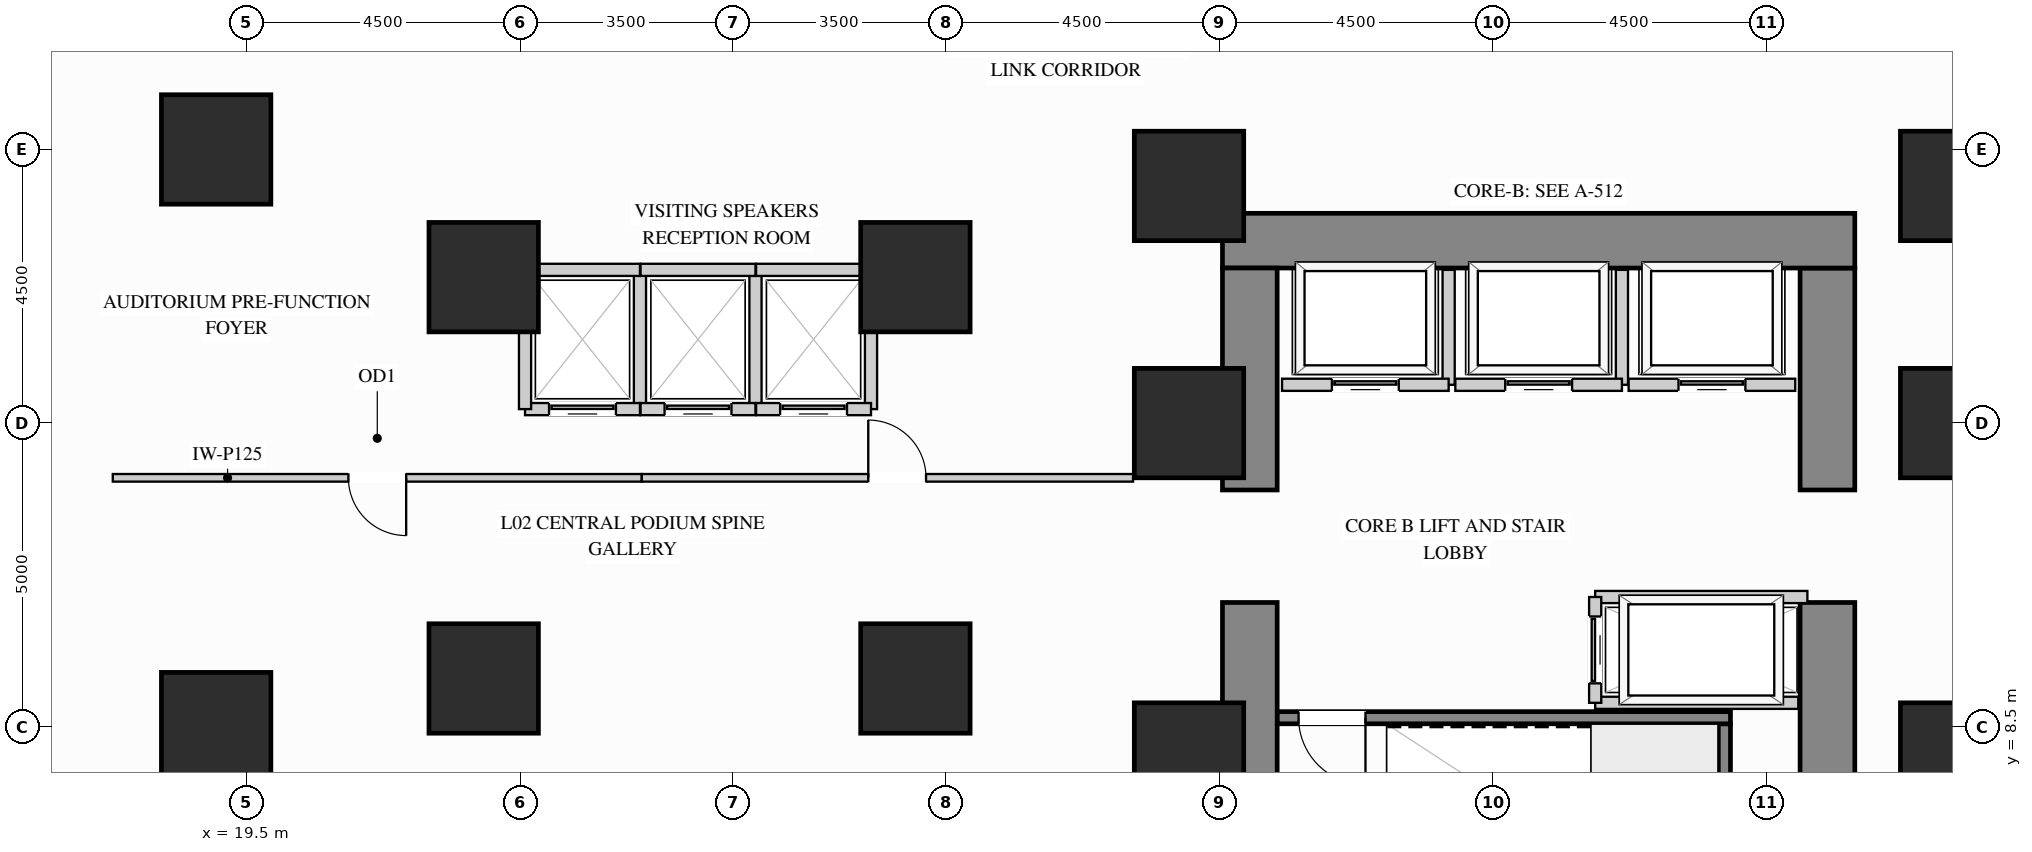
"""IFC4 building model, lengths in metres.
Left out: names, types, materials, properties, quantities, classifications, styles, units other than length and angle.
Written with IfcOpenShell. Run it as: python <this file> out.ifc"""

import sys

from ifc_helpers import new_model, si_unit, direction, frame, frame_2d, origin, origin_2d, place, context, subcontext, project, spatial, rectangle, extrude, source, transform, mapped, element, fill, save


model = new_model("IFC4")
c1 = context("Model", 3, precision=1e-05, world=origin(), true_north=direction((0.0, 1.0)))
c2 = subcontext(c1, "Body", "Model", "MODEL_VIEW")
j1 = project(units=[si_unit("LENGTHUNIT", "METRE"), si_unit("PLANEANGLEUNIT", "RADIAN")], contexts=[c1])
p1 = place(None, origin())
s1 = spatial("IfcSite", under=j1, at=p1, CompositionType="ELEMENT")
p2 = place(p1, origin())
s2 = spatial("IfcBuilding", under=s1, at=p2, CompositionType="ELEMENT")
p3 = place(p2, frame((0.0, 0.0, 9.0)))
s3 = spatial("IfcBuildingStorey", under=s2, at=p3, CompositionType="ELEMENT", Elevation=9.0)
m1 = source(origin(), c2, "Body", "SweptSolid", [
    extrude(rectangle(XDim=1.8, YDim=1.8, at=origin_2d()), origin(), (0.0, 0.0, 1.0), 4.25),
])
for number, where, z_axis, x_axis in (
    (1, (47.6, 8.0, 0.0), (0.0, 0.0, 1.0), (1.0, 0.0, 0.0)),
    (2, (47.6, 13.5, 0.0), (0.0, 0.0, 1.0), (1.0, 0.0, 0.0)),
    (3, (47.6, 17.4, 0.0), (0.0, 0.0, 1.0), (1.0, 0.0, 0.0)),
    (4, (19.0, 8.5, 0.0), (0.0, 0.0, 1.0), (1.0, 0.0, 0.0)),
    (5, (19.0, 18.0, 0.0), (0.0, 0.0, 1.0), (1.0, 0.0, 0.0)),
    (6, (35.0, 8.0, 0.0), (0.0, 0.0, 1.0), (1.0, 0.0, 0.0)),
    (7, (35.0, 13.5, 0.0), (0.0, 0.0, 1.0), (1.0, 0.0, 0.0)),
    (8, (35.0, 17.4, 0.0), (0.0, 0.0, 1.0), (1.0, 0.0, 0.0)),
    (9, (23.4, 9.3, 0.0), (0.0, 0.0, 1.0), (1.0, 0.0, 0.0)),
    (10, (30.5, 9.3, 0.0), (0.0, 0.0, 1.0), (1.0, 0.0, 0.0)),
    (11, (23.4, 15.9, 0.0), (0.0, 0.0, 1.0), (1.0, 0.0, 0.0)),
    (12, (30.5, 15.9, 0.0), (0.0, 0.0, 1.0), (1.0, 0.0, 0.0)),
):
    element("IfcColumn", number, at=place(p3, frame(where, z_axis=z_axis, x_axis=x_axis)), inside=s3, PredefinedType="COLUMN", context=c2, shape_type="MappedRepresentation", body=[
        mapped(m1, transform((0.0, 0.0, 0.0), x_axis=(1.0, 0.0, 0.0), y_axis=(0.0, 1.0, 0.0), z_axis=(0.0, 0.0, 1.0))),
    ])
m2 = source(origin(), c2, "Body", "SweptSolid", [
    extrude(rectangle(XDim=5.6, YDim=0.9, at=frame_2d((2.8, 0.0))), origin(), (0.0, 0.0, 1.0), 4.25),
])
p4 = place(p3, frame((45.5, 4.95, 0.0), z_axis=(0.0, 0.0, 1.0), x_axis=(0.0, 1.0, 0.0)))
e13 = element("IfcWall", 13, at=p4, inside=s3, PredefinedType="SHEAR", context=c2, shape_type="MappedRepresentation", body=[
    mapped(m2, transform((0.0, 0.0, 0.0), x_axis=(1.0, 0.0, 0.0), y_axis=(0.0, 1.0, 0.0), z_axis=(0.0, 0.0, 1.0))),
])
m3 = source(origin(), c2, "Body", "SweptSolid", [
    extrude(rectangle(XDim=3.65, YDim=0.9, at=frame_2d((1.825, 0.0))), origin(), (0.0, 0.0, 1.0), 4.25),
])
p5 = place(p3, frame((45.5, 12.4, 0.0), z_axis=(0.0, 0.0, 1.0), x_axis=(0.0, 1.0, 0.0)))
e14 = element("IfcWall", 14, at=p5, inside=s3, PredefinedType="SHEAR", context=c2, shape_type="MappedRepresentation", body=[
    mapped(m3, transform((0.0, 0.0, 0.0), x_axis=(1.0, 0.0, 0.0), y_axis=(0.0, 1.0, 0.0), z_axis=(0.0, 0.0, 1.0))),
])
m4 = source(origin(), c2, "Body", "SweptSolid", [
    extrude(rectangle(XDim=10.4, YDim=0.9, at=frame_2d((5.2, 0.0))), origin(), (0.0, 0.0, 1.0), 4.25),
])
p6 = place(p3, frame((35.55, 16.5, 0.0), z_axis=(0.0, 0.0, 1.0), x_axis=(1.0, 0.0, 0.0)))
e15 = element("IfcWall", 15, at=p6, inside=s3, PredefinedType="SHEAR", context=c2, shape_type="MappedRepresentation", body=[
    mapped(m4, transform((0.0, 0.0, 0.0), x_axis=(1.0, 0.0, 0.0), y_axis=(0.0, 1.0, 0.0), z_axis=(0.0, 0.0, 1.0))),
])
p7 = place(p3, frame((36.0, 4.95, 0.0), z_axis=(0.0, 0.0, 1.0), x_axis=(0.0, 1.0, 0.0)))
e16 = element("IfcWall", 16, at=p7, inside=s3, PredefinedType="SHEAR", context=c2, shape_type="MappedRepresentation", body=[
    mapped(m2, transform((0.0, 0.0, 0.0), x_axis=(1.0, 0.0, 0.0), y_axis=(0.0, 1.0, 0.0), z_axis=(0.0, 0.0, 1.0))),
])
p8 = place(p3, frame((36.0, 12.4, 0.0), z_axis=(0.0, 0.0, 1.0), x_axis=(0.0, 1.0, 0.0)))
e17 = element("IfcWall", 17, at=p8, inside=s3, PredefinedType="SHEAR", context=c2, shape_type="MappedRepresentation", body=[
    mapped(m3, transform((0.0, 0.0, 0.0), x_axis=(1.0, 0.0, 0.0), y_axis=(0.0, 1.0, 0.0), z_axis=(0.0, 0.0, 1.0))),
])
p9 = place(p3, frame((17.3, 12.6, 0.0), z_axis=(0.0, 0.0, 1.0), x_axis=(1.0, 0.0, 0.0)))
e18 = element("IfcWall", 18, at=p9, inside=s3, PredefinedType="PARTITIONING", context=c2, shape_type="SweptSolid", body=[
    extrude(rectangle(XDim=8.7, YDim=0.125, at=frame_2d((4.35, 0.0))), origin(), (0.0, 0.0, 1.0), 4.235),
])
p10 = place(p9, frame((3.875, 0.0, 0.0)))
e19 = element("IfcOpeningElement", 19, at=p10, cuts=e18, PredefinedType="OPENING", context=c2, shape_type="SweptSolid", body=[
    extrude(rectangle(XDim=0.95, YDim=2.15, at=frame_2d((0.475, 1.075))), frame((0.0, 0.073, 0.0), z_axis=(0.0, -1.0, 0.0), x_axis=(1.0, 0.0, 0.0)), (0.0, 0.0, 1.0), 0.145),
])
p11 = place(p3, frame((26.0, 12.6, 0.0), z_axis=(0.0, 0.0, 1.0), x_axis=(1.0, 0.0, 0.0)))
e20 = element("IfcWall", 20, at=p11, inside=s3, PredefinedType="PARTITIONING", context=c2, shape_type="SweptSolid", body=[
    extrude(rectangle(XDim=8.08, YDim=0.125, at=frame_2d((4.04, 0.0))), origin(), (0.0, 0.0, 1.0), 4.235),
])
p12 = place(p11, frame((3.725, 0.0, 0.0)))
e21 = element("IfcOpeningElement", 21, at=p12, cuts=e20, PredefinedType="OPENING", context=c2, shape_type="SweptSolid", body=[
    extrude(rectangle(XDim=0.95, YDim=2.15, at=frame_2d((0.475, 1.075))), frame((0.0, 0.073, 0.0), z_axis=(0.0, -1.0, 0.0), x_axis=(1.0, 0.0, 0.0)), (0.0, 0.0, 1.0), 0.145),
])
m5 = source(origin(), c2, "Body", "SweptSolid", [
    extrude(rectangle(XDim=1.89, YDim=0.2, at=frame_2d((0.945, 0.0))), origin(), (0.0, 0.0, 1.0), 4.235),
])
p13 = place(p3, frame((39.27, 14.13, 0.0), z_axis=(0.0, 0.0, 1.0), x_axis=(0.0, 1.0, 0.0)))
e22 = element("IfcWall", 22, at=p13, inside=s3, PredefinedType="PARTITIONING", context=c2, shape_type="MappedRepresentation", body=[
    mapped(m5, transform((0.0, 0.0, 0.0), x_axis=(1.0, 0.0, 0.0), y_axis=(0.0, 1.0, 0.0), z_axis=(0.0, 0.0, 1.0))),
])
p14 = place(p3, frame((36.53, 14.13, 0.0), z_axis=(0.0, 0.0, 1.0), x_axis=(1.0, 0.0, 0.0)))
e23 = element("IfcWall", 23, at=p14, inside=s3, PredefinedType="PARTITIONING", context=c2, shape_type="SweptSolid", body=[
    extrude(rectangle(XDim=2.74, YDim=0.2, at=frame_2d((1.37, 0.0))), origin(), (0.0, 0.0, 1.0), 4.235),
])
p15 = place(p14, frame((0.82, 0.0, 0.0)))
e24 = element("IfcOpeningElement", 24, at=p15, cuts=e23, PredefinedType="OPENING", context=c2, shape_type="SweptSolid", body=[
    extrude(rectangle(XDim=1.1, YDim=2.2, at=frame_2d((0.55, 1.1))), frame((0.0, 0.11, 0.0), z_axis=(0.0, -1.0, 0.0), x_axis=(1.0, 0.0, 0.0)), (0.0, 0.0, 1.0), 0.22),
])
p16 = place(p3, frame((42.12, 14.13, 0.0), z_axis=(0.0, 0.0, 1.0), x_axis=(0.0, 1.0, 0.0)))
e25 = element("IfcWall", 25, at=p16, inside=s3, PredefinedType="PARTITIONING", context=c2, shape_type="MappedRepresentation", body=[
    mapped(m5, transform((0.0, 0.0, 0.0), x_axis=(1.0, 0.0, 0.0), y_axis=(0.0, 1.0, 0.0), z_axis=(0.0, 0.0, 1.0))),
])
p17 = place(p3, frame((39.38, 14.13, 0.0), z_axis=(0.0, 0.0, 1.0), x_axis=(1.0, 0.0, 0.0)))
e26 = element("IfcWall", 26, at=p17, inside=s3, PredefinedType="PARTITIONING", context=c2, shape_type="SweptSolid", body=[
    extrude(rectangle(XDim=2.74, YDim=0.2, at=frame_2d((1.37, 0.0))), origin(), (0.0, 0.0, 1.0), 4.235),
])
p18 = place(p17, frame((0.82, 0.0, 0.0)))
e27 = element("IfcOpeningElement", 27, at=p18, cuts=e26, PredefinedType="OPENING", context=c2, shape_type="SweptSolid", body=[
    extrude(rectangle(XDim=1.1, YDim=2.2, at=frame_2d((0.55, 1.1))), frame((0.0, 0.11, 0.0), z_axis=(0.0, -1.0, 0.0), x_axis=(1.0, 0.0, 0.0)), (0.0, 0.0, 1.0), 0.22),
])
p19 = place(p3, frame((42.23, 14.13, 0.0), z_axis=(0.0, 0.0, 1.0), x_axis=(1.0, 0.0, 0.0)))
e28 = element("IfcWall", 28, at=p19, inside=s3, PredefinedType="PARTITIONING", context=c2, shape_type="SweptSolid", body=[
    extrude(rectangle(XDim=2.74, YDim=0.2, at=frame_2d((1.37, 0.0))), origin(), (0.0, 0.0, 1.0), 4.235),
])
p20 = place(p19, frame((0.82, 0.0, 0.0)))
e29 = element("IfcOpeningElement", 29, at=p20, cuts=e28, PredefinedType="OPENING", context=c2, shape_type="SweptSolid", body=[
    extrude(rectangle(XDim=1.1, YDim=2.2, at=frame_2d((0.55, 1.1))), frame((0.0, 0.11, 0.0), z_axis=(0.0, -1.0, 0.0), x_axis=(1.0, 0.0, 0.0)), (0.0, 0.0, 1.0), 0.22),
])
m6 = source(origin(), c2, "Body", "SweptSolid", [
    extrude(rectangle(XDim=2.29, YDim=0.2, at=frame_2d((1.145, 0.0))), origin(), (0.0, 0.0, 1.0), 4.235),
])
p21 = place(p3, frame((25.97, 13.73, 0.0), z_axis=(0.0, 0.0, 1.0), x_axis=(0.0, 1.0, 0.0)))
e30 = element("IfcWall", 30, at=p21, inside=s3, PredefinedType="PARTITIONING", context=c2, shape_type="MappedRepresentation", body=[
    mapped(m6, transform((0.0, 0.0, 0.0), x_axis=(1.0, 0.0, 0.0), y_axis=(0.0, 1.0, 0.0), z_axis=(0.0, 0.0, 1.0))),
])
m7 = source(origin(), c2, "Body", "SweptSolid", [
    extrude(rectangle(XDim=1.89, YDim=0.2, at=frame_2d((0.945, 0.0))), origin(), (0.0, 0.0, 1.0), 4.235),
])
p22 = place(p3, frame((24.08, 16.02, 0.0), z_axis=(0.0, 0.0, 1.0), x_axis=(1.0, 0.0, 0.0)))
e31 = element("IfcWall", 31, at=p22, inside=s3, PredefinedType="PARTITIONING", context=c2, shape_type="MappedRepresentation", body=[
    mapped(m7, transform((0.0, 0.0, 0.0), x_axis=(1.0, 0.0, 0.0), y_axis=(0.0, 1.0, 0.0), z_axis=(0.0, 0.0, 1.0))),
])
p23 = place(p3, frame((24.08, 13.73, 0.0), z_axis=(0.0, 0.0, 1.0), x_axis=(1.0, 0.0, 0.0)))
e32 = element("IfcWall", 32, at=p23, inside=s3, PredefinedType="PARTITIONING", context=c2, shape_type="SweptSolid", body=[
    extrude(rectangle(XDim=1.89, YDim=0.2, at=frame_2d((0.945, 0.0))), origin(), (0.0, 0.0, 1.0), 4.235),
])
p24 = place(p23, frame((0.395, 0.0, 0.0)))
e33 = element("IfcOpeningElement", 33, at=p24, cuts=e32, PredefinedType="OPENING", context=c2, shape_type="SweptSolid", body=[
    extrude(rectangle(XDim=1.1, YDim=2.2, at=frame_2d((0.55, 1.1))), frame((0.0, 0.11, 0.0), z_axis=(0.0, -1.0, 0.0), x_axis=(1.0, 0.0, 0.0)), (0.0, 0.0, 1.0), 0.22),
])
for number, where, z_axis, x_axis in (
    (34, (24.08, 13.73, 0.0), (0.0, 0.0, 1.0), (0.0, 1.0, 0.0)),
    (35, (27.87, 13.73, 0.0), (0.0, 0.0, 1.0), (0.0, 1.0, 0.0)),
):
    element("IfcWall", number, at=place(p3, frame(where, z_axis=z_axis, x_axis=x_axis)), inside=s3, PredefinedType="PARTITIONING", context=c2, shape_type="MappedRepresentation", body=[
        mapped(m6, transform((0.0, 0.0, 0.0), x_axis=(1.0, 0.0, 0.0), y_axis=(0.0, 1.0, 0.0), z_axis=(0.0, 0.0, 1.0))),
    ])
p25 = place(p3, frame((25.98, 16.02, 0.0), z_axis=(0.0, 0.0, 1.0), x_axis=(1.0, 0.0, 0.0)))
e36 = element("IfcWall", 36, at=p25, inside=s3, PredefinedType="PARTITIONING", context=c2, shape_type="MappedRepresentation", body=[
    mapped(m5, transform((0.0, 0.0, 0.0), x_axis=(1.0, 0.0, 0.0), y_axis=(0.0, 1.0, 0.0), z_axis=(0.0, 0.0, 1.0))),
])
p26 = place(p3, frame((25.98, 13.73, 0.0), z_axis=(0.0, 0.0, 1.0), x_axis=(1.0, 0.0, 0.0)))
e37 = element("IfcWall", 37, at=p26, inside=s3, PredefinedType="PARTITIONING", context=c2, shape_type="SweptSolid", body=[
    extrude(rectangle(XDim=1.89, YDim=0.2, at=frame_2d((0.945, 0.0))), origin(), (0.0, 0.0, 1.0), 4.235),
])
p27 = place(p26, frame((0.395, 0.0, 0.0)))
e38 = element("IfcOpeningElement", 38, at=p27, cuts=e37, PredefinedType="OPENING", context=c2, shape_type="SweptSolid", body=[
    extrude(rectangle(XDim=1.1, YDim=2.2, at=frame_2d((0.55, 1.1))), frame((0.0, 0.11, 0.0), z_axis=(0.0, -1.0, 0.0), x_axis=(1.0, 0.0, 0.0)), (0.0, 0.0, 1.0), 0.22),
])
p28 = place(p3, frame((29.77, 13.73, 0.0), z_axis=(0.0, 0.0, 1.0), x_axis=(0.0, 1.0, 0.0)))
e39 = element("IfcWall", 39, at=p28, inside=s3, PredefinedType="PARTITIONING", context=c2, shape_type="MappedRepresentation", body=[
    mapped(m6, transform((0.0, 0.0, 0.0), x_axis=(1.0, 0.0, 0.0), y_axis=(0.0, 1.0, 0.0), z_axis=(0.0, 0.0, 1.0))),
])
p29 = place(p3, frame((27.88, 16.02, 0.0), z_axis=(0.0, 0.0, 1.0), x_axis=(1.0, 0.0, 0.0)))
e40 = element("IfcWall", 40, at=p29, inside=s3, PredefinedType="PARTITIONING", context=c2, shape_type="MappedRepresentation", body=[
    mapped(m5, transform((0.0, 0.0, 0.0), x_axis=(1.0, 0.0, 0.0), y_axis=(0.0, 1.0, 0.0), z_axis=(0.0, 0.0, 1.0))),
])
p30 = place(p3, frame((27.88, 13.73, 0.0), z_axis=(0.0, 0.0, 1.0), x_axis=(1.0, 0.0, 0.0)))
e41 = element("IfcWall", 41, at=p30, inside=s3, PredefinedType="PARTITIONING", context=c2, shape_type="SweptSolid", body=[
    extrude(rectangle(XDim=1.89, YDim=0.2, at=frame_2d((0.945, 0.0))), origin(), (0.0, 0.0, 1.0), 4.235),
])
p31 = place(p30, frame((0.395, 0.0, 0.0)))
e42 = element("IfcOpeningElement", 42, at=p31, cuts=e41, PredefinedType="OPENING", context=c2, shape_type="SweptSolid", body=[
    extrude(rectangle(XDim=1.1, YDim=2.2, at=frame_2d((0.55, 1.1))), frame((0.0, 0.11, 0.0), z_axis=(0.0, -1.0, 0.0), x_axis=(1.0, 0.0, 0.0)), (0.0, 0.0, 1.0), 0.22),
])
m8 = source(origin(), c2, "Body", "SweptSolid", [
    extrude(rectangle(XDim=3.49, YDim=0.2, at=frame_2d((1.745, 0.0))), origin(), (0.0, 0.0, 1.0), 4.235),
])
p32 = place(p3, frame((41.68, 10.64, 0.0), z_axis=(0.0, 0.0, 1.0), x_axis=(1.0, 0.0, 0.0)))
e43 = element("IfcWall", 43, at=p32, inside=s3, PredefinedType="PARTITIONING", context=c2, shape_type="MappedRepresentation", body=[
    mapped(m8, transform((0.0, 0.0, 0.0), x_axis=(1.0, 0.0, 0.0), y_axis=(0.0, 1.0, 0.0), z_axis=(0.0, 0.0, 1.0))),
])
m9 = source(origin(), c2, "Body", "SweptSolid", [
    extrude(rectangle(XDim=3.34, YDim=0.2, at=frame_2d((1.67, 0.0))), origin(), (0.0, 0.0, 1.0), 4.235),
])
p33 = place(p3, frame((41.68, 8.9, 0.0), z_axis=(0.0, 0.0, 1.0), x_axis=(1.0, 0.0, 0.0)))
e44 = element("IfcWall", 44, at=p33, inside=s3, PredefinedType="PARTITIONING", context=c2, shape_type="MappedRepresentation", body=[
    mapped(m9, transform((0.0, 0.0, 0.0), x_axis=(1.0, 0.0, 0.0), y_axis=(0.0, 1.0, 0.0), z_axis=(0.0, 0.0, 1.0))),
])
p34 = place(p3, frame((41.68, 8.9, 0.0), z_axis=(0.0, 0.0, 1.0), x_axis=(0.0, 1.0, 0.0)))
e45 = element("IfcWall", 45, at=p34, inside=s3, PredefinedType="PARTITIONING", context=c2, shape_type="SweptSolid", body=[
    extrude(rectangle(XDim=1.74, YDim=0.2, at=frame_2d((0.87, 0.0))), origin(), (0.0, 0.0, 1.0), 4.235),
])
p35 = place(p34, frame((0.32, 0.0, 0.0)))
e46 = element("IfcOpeningElement", 46, at=p35, cuts=e45, PredefinedType="OPENING", context=c2, shape_type="SweptSolid", body=[
    extrude(rectangle(XDim=1.1, YDim=2.2, at=frame_2d((0.55, 1.1))), frame((0.0, 0.11, 0.0), z_axis=(0.0, -1.0, 0.0), x_axis=(1.0, 0.0, 0.0)), (0.0, 0.0, 1.0), 0.22),
])
m10 = source(origin(), c2, "Body", "SweptSolid", [
    extrude(rectangle(XDim=3.603, YDim=0.2, at=frame_2d((1.802, 0.0))), origin(), (0.0, 0.0, 1.0), 4.25),
])
p36 = place(p3, frame((43.805, 4.952, 0.0), z_axis=(0.0, 0.0, 1.0), x_axis=(0.0, 1.0, 0.0)))
e47 = element("IfcWall", 47, at=p36, inside=s3, PredefinedType="SHEAR", context=c2, shape_type="MappedRepresentation", body=[
    mapped(m10, transform((0.0, 0.0, 0.0), x_axis=(1.0, 0.0, 0.0), y_axis=(0.0, 1.0, 0.0), z_axis=(0.0, 0.0, 1.0))),
])
p37 = place(p3, frame((36.452, 8.655, 0.0), z_axis=(0.0, 0.0, 1.0), x_axis=(1.0, 0.0, 0.0)))
e48 = element("IfcWall", 48, at=p37, inside=s3, PredefinedType="SHEAR", context=c2, shape_type="SweptSolid", body=[
    extrude(rectangle(XDim=7.453, YDim=0.2, at=frame_2d((3.727, 0.0))), origin(), (0.0, 0.0, 1.0), 4.25),
])
p38 = place(p37, frame((0.35, 0.0, 0.0)))
e49 = element("IfcOpeningElement", 49, at=p38, cuts=e48, PredefinedType="OPENING", context=c2, shape_type="SweptSolid", body=[
    extrude(rectangle(XDim=1.1, YDim=2.15, at=frame_2d((0.55, 1.075))), frame((0.0, 0.11, 0.0), z_axis=(0.0, -1.0, 0.0), x_axis=(1.0, 0.0, 0.0)), (0.0, 0.0, 1.0), 0.22),
])
m11 = source(origin(), c2, "Body", "SweptSolid", [
    extrude(rectangle(XDim=1.1, YDim=2.2, at=frame_2d((0.55, 1.1))), frame((0.0, 0.025, 0.0), z_axis=(0.0, -1.0, 0.0), x_axis=(1.0, 0.0, 0.0)), (0.0, 0.0, 1.0), 0.05),
])
p39 = place(p15, origin())
e50 = element("IfcDoor", 50, at=p39, inside=s3, OperationType="SLIDING_TO_LEFT", PredefinedType="DOOR", context=c2, shape_type="MappedRepresentation", body=[
    mapped(m11, transform((0.0, 0.0, 0.0), x_axis=(1.0, 0.0, 0.0), y_axis=(0.0, 1.0, 0.0), z_axis=(0.0, 0.0, 1.0))),
])
fill(e24, e50)
p40 = place(p18, origin())
e51 = element("IfcDoor", 51, at=p40, inside=s3, OperationType="SLIDING_TO_LEFT", PredefinedType="DOOR", context=c2, shape_type="MappedRepresentation", body=[
    mapped(m11, transform((0.0, 0.0, 0.0), x_axis=(1.0, 0.0, 0.0), y_axis=(0.0, 1.0, 0.0), z_axis=(0.0, 0.0, 1.0))),
])
fill(e27, e51)
p41 = place(p20, origin())
e52 = element("IfcDoor", 52, at=p41, inside=s3, OperationType="SLIDING_TO_LEFT", PredefinedType="DOOR", context=c2, shape_type="MappedRepresentation", body=[
    mapped(m11, transform((0.0, 0.0, 0.0), x_axis=(1.0, 0.0, 0.0), y_axis=(0.0, 1.0, 0.0), z_axis=(0.0, 0.0, 1.0))),
])
fill(e29, e52)
p42 = place(p24, origin())
e53 = element("IfcDoor", 53, at=p42, inside=s3, OperationType="SLIDING_TO_LEFT", PredefinedType="DOOR", context=c2, shape_type="MappedRepresentation", body=[
    mapped(m11, transform((0.0, 0.0, 0.0), x_axis=(1.0, 0.0, 0.0), y_axis=(0.0, 1.0, 0.0), z_axis=(0.0, 0.0, 1.0))),
])
fill(e33, e53)
p43 = place(p27, origin())
e54 = element("IfcDoor", 54, at=p43, inside=s3, OperationType="SLIDING_TO_LEFT", PredefinedType="DOOR", context=c2, shape_type="MappedRepresentation", body=[
    mapped(m11, transform((0.0, 0.0, 0.0), x_axis=(1.0, 0.0, 0.0), y_axis=(0.0, 1.0, 0.0), z_axis=(0.0, 0.0, 1.0))),
])
fill(e38, e54)
p44 = place(p31, origin())
e55 = element("IfcDoor", 55, at=p44, inside=s3, OperationType="SLIDING_TO_LEFT", PredefinedType="DOOR", context=c2, shape_type="MappedRepresentation", body=[
    mapped(m11, transform((0.0, 0.0, 0.0), x_axis=(1.0, 0.0, 0.0), y_axis=(0.0, 1.0, 0.0), z_axis=(0.0, 0.0, 1.0))),
])
fill(e42, e55)
p45 = place(p35, origin())
e56 = element("IfcDoor", 56, at=p45, inside=s3, OperationType="SLIDING_TO_LEFT", PredefinedType="DOOR", context=c2, shape_type="MappedRepresentation", body=[
    mapped(m11, transform((0.0, 0.0, 0.0), x_axis=(1.0, 0.0, 0.0), y_axis=(0.0, 1.0, 0.0), z_axis=(0.0, 0.0, 1.0))),
])
fill(e46, e56)
m12 = source(origin(), c2, "Body", "SweptSolid", [
    extrude(rectangle(XDim=0.95, YDim=2.15, at=frame_2d((0.475, 1.075))), frame((0.0, 0.025, 0.0), z_axis=(0.0, -1.0, 0.0), x_axis=(1.0, 0.0, 0.0)), (0.0, 0.0, 1.0), 0.05),
])
p46 = place(p10, origin())
e57 = element("IfcDoor", 57, at=p46, inside=s3, OperationType="SINGLE_SWING_RIGHT", PredefinedType="DOOR", context=c2, shape_type="MappedRepresentation", body=[
    mapped(m12, transform((0.0, 0.0, 0.0), x_axis=(1.0, 0.0, 0.0), y_axis=(0.0, 1.0, 0.0), z_axis=(0.0, 0.0, 1.0))),
])
fill(e19, e57)
p47 = place(p12, origin())
e58 = element("IfcDoor", 58, at=p47, inside=s3, OperationType="SINGLE_SWING_LEFT", PredefinedType="DOOR", context=c2, shape_type="MappedRepresentation", body=[
    mapped(m12, transform((0.0, 0.0, 0.0), x_axis=(1.0, 0.0, 0.0), y_axis=(0.0, 1.0, 0.0), z_axis=(0.0, 0.0, 1.0))),
])
fill(e21, e58)
m13 = source(origin(), c2, "Body", "SweptSolid", [
    extrude(rectangle(XDim=1.1, YDim=2.15, at=frame_2d((0.55, 1.075))), frame((0.0, 0.025, 0.0), z_axis=(0.0, -1.0, 0.0), x_axis=(1.0, 0.0, 0.0)), (0.0, 0.0, 1.0), 0.05),
])
p48 = place(p38, origin())
e59 = element("IfcDoor", 59, at=p48, inside=s3, OperationType="SINGLE_SWING_RIGHT", PredefinedType="DOOR", context=c2, shape_type="MappedRepresentation", body=[
    mapped(m13, transform((0.0, 0.0, 0.0), x_axis=(1.0, 0.0, 0.0), y_axis=(0.0, 1.0, 0.0), z_axis=(0.0, 0.0, 1.0))),
])
fill(e49, e59)
save(model, sys.argv[1])
